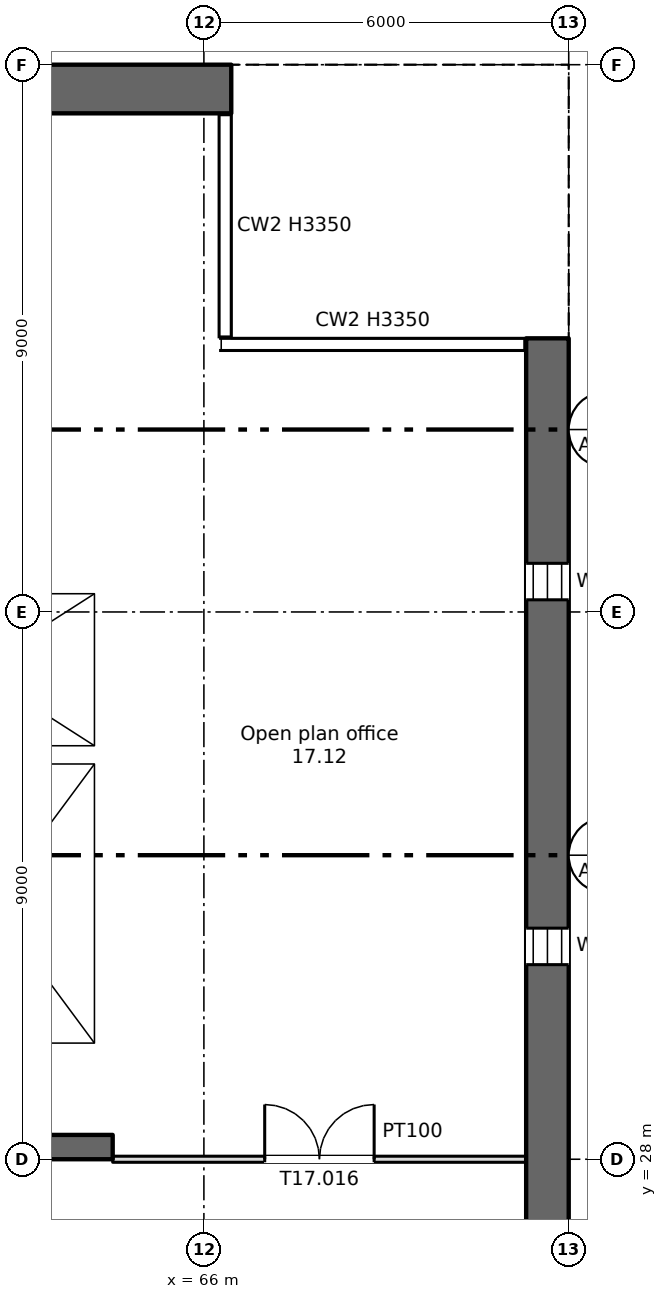
"""IFC4 building model, lengths in metres.
Left out: names, types, materials, properties, quantities, classifications, styles, units other than length and angle.
Written with IfcOpenShell. Run it as: python <this file> out.ifc"""

import sys

from ifc_helpers import new_model, si_unit, direction, frame, frame_2d, origin, place, context, subcontext, project, spatial, rectangle, extrude, element, fill, save


model = new_model("IFC4")
c1 = context("Model", 3, precision=1e-05, world=origin(), true_north=direction((0.0, 1.0)))
c2 = subcontext(c1, "Body", "Model", "MODEL_VIEW")
j1 = project(units=[si_unit("LENGTHUNIT", "METRE"), si_unit("PLANEANGLEUNIT", "RADIAN")], contexts=[c1])
p1 = place(None, origin())
s1 = spatial("IfcSite", under=j1, at=p1, CompositionType="ELEMENT")
p2 = place(p1, origin())
s2 = spatial("IfcBuilding", under=s1, at=p2, CompositionType="ELEMENT")
p3 = place(p2, frame((0.0, 0.0, 106.25)))
s3 = spatial("IfcBuildingStorey", under=s2, at=p3, CompositionType="ELEMENT", Elevation=106.25)
p4 = place(p3, frame((71.65, 6.0, 0.0), z_axis=(0.0, 0.0, 1.0), x_axis=(0.0, 1.0, 0.0)))
e1 = element("IfcWall", 1, at=p4, inside=s3, PredefinedType="SHEAR", context=c2, shape_type="SweptSolid", body=[
    extrude(rectangle(XDim=35.5, YDim=0.7, at=frame_2d((17.75, 0.0))), origin(), (0.0, 0.0, 1.0), 3.35),
])
p5 = place(p4, frame((1.2, 0.0, 0.6)))
e2 = element("IfcOpeningElement", 2, at=p5, cuts=e1, PredefinedType="OPENING", context=c2, shape_type="SweptSolid", body=[
    extrude(rectangle(XDim=0.6, YDim=2.4, at=frame_2d((0.3, 1.2))), frame((0.0, 0.36, 0.0), z_axis=(0.0, -1.0, 0.0), x_axis=(1.0, 0.0, 0.0)), (0.0, 0.0, 1.0), 0.72),
])
p6 = place(p4, frame((7.2, 0.0, 0.6)))
e3 = element("IfcOpeningElement", 3, at=p6, cuts=e1, PredefinedType="OPENING", context=c2, shape_type="SweptSolid", body=[
    extrude(rectangle(XDim=0.6, YDim=2.4, at=frame_2d((0.3, 1.2))), frame((0.0, 0.36, 0.0), z_axis=(0.0, -1.0, 0.0), x_axis=(1.0, 0.0, 0.0)), (0.0, 0.0, 1.0), 0.72),
])
p7 = place(p4, frame((13.2, 0.0, 0.6)))
e4 = element("IfcOpeningElement", 4, at=p7, cuts=e1, PredefinedType="OPENING", context=c2, shape_type="SweptSolid", body=[
    extrude(rectangle(XDim=0.6, YDim=2.4, at=frame_2d((0.3, 1.2))), frame((0.0, 0.36, 0.0), z_axis=(0.0, -1.0, 0.0), x_axis=(1.0, 0.0, 0.0)), (0.0, 0.0, 1.0), 0.72),
])
p8 = place(p4, frame((19.2, 0.0, 0.6)))
e5 = element("IfcOpeningElement", 5, at=p8, cuts=e1, PredefinedType="OPENING", context=c2, shape_type="SweptSolid", body=[
    extrude(rectangle(XDim=0.6, YDim=2.4, at=frame_2d((0.3, 1.2))), frame((0.0, 0.36, 0.0), z_axis=(0.0, -1.0, 0.0), x_axis=(1.0, 0.0, 0.0)), (0.0, 0.0, 1.0), 0.72),
])
p9 = place(p4, frame((25.2, 0.0, 0.6)))
e6 = element("IfcOpeningElement", 6, at=p9, cuts=e1, PredefinedType="OPENING", context=c2, shape_type="SweptSolid", body=[
    extrude(rectangle(XDim=0.6, YDim=2.4, at=frame_2d((0.3, 1.2))), frame((0.0, 0.36, 0.0), z_axis=(0.0, -1.0, 0.0), x_axis=(1.0, 0.0, 0.0)), (0.0, 0.0, 1.0), 0.72),
])
p10 = place(p4, frame((31.2, 0.0, 0.6)))
e7 = element("IfcOpeningElement", 7, at=p10, cuts=e1, PredefinedType="OPENING", context=c2, shape_type="SweptSolid", body=[
    extrude(rectangle(XDim=0.6, YDim=2.4, at=frame_2d((0.3, 1.2))), frame((0.0, 0.36, 0.0), z_axis=(0.0, -1.0, 0.0), x_axis=(1.0, 0.0, 0.0)), (0.0, 0.0, 1.0), 0.72),
])
p11 = place(p3, frame((5.55, 45.6, 0.0), z_axis=(0.0, 0.0, 1.0), x_axis=(1.0, 0.0, 0.0)))
e8 = element("IfcWall", 8, at=p11, inside=s3, PredefinedType="SHEAR", context=c2, shape_type="SweptSolid", body=[
    extrude(rectangle(XDim=60.9, YDim=0.8, at=frame_2d((30.45, 0.0))), origin(), (0.0, 0.0, 1.0), 3.35),
])
p12 = place(p11, frame((1.2, 0.0, 0.6)))
e9 = element("IfcOpeningElement", 9, at=p12, cuts=e8, PredefinedType="OPENING", context=c2, shape_type="SweptSolid", body=[
    extrude(rectangle(XDim=0.6, YDim=2.4, at=frame_2d((0.3, 1.2))), frame((0.0, 0.41, 0.0), z_axis=(0.0, -1.0, 0.0), x_axis=(1.0, 0.0, 0.0)), (0.0, 0.0, 1.0), 0.82),
])
p13 = place(p11, frame((7.2, 0.0, 0.6)))
e10 = element("IfcOpeningElement", 10, at=p13, cuts=e8, PredefinedType="OPENING", context=c2, shape_type="SweptSolid", body=[
    extrude(rectangle(XDim=0.6, YDim=2.4, at=frame_2d((0.3, 1.2))), frame((0.0, 0.41, 0.0), z_axis=(0.0, -1.0, 0.0), x_axis=(1.0, 0.0, 0.0)), (0.0, 0.0, 1.0), 0.82),
])
p14 = place(p3, frame((6.7, 28.2, 0.0), z_axis=(0.0, 0.0, 1.0), x_axis=(1.0, 0.0, 0.0)))
e11 = element("IfcWall", 11, at=p14, inside=s3, PredefinedType="SHEAR", context=c2, shape_type="SweptSolid", body=[
    extrude(rectangle(XDim=57.8, YDim=0.4, at=frame_2d((28.9, 0.0))), origin(), (0.0, 0.0, 1.0), 3.35),
])
p15 = place(p14, frame((13.85, 0.0, 0.0)))
e12 = element("IfcOpeningElement", 12, at=p15, cuts=e11, PredefinedType="OPENING", context=c2, shape_type="SweptSolid", body=[
    extrude(rectangle(XDim=0.9, YDim=2.1, at=frame_2d((0.45, 1.05))), frame((0.0, 0.21, 0.0), z_axis=(0.0, -1.0, 0.0), x_axis=(1.0, 0.0, 0.0)), (0.0, 0.0, 1.0), 0.42),
])
p16 = place(p14, frame((48.562, 0.0, 0.0)))
e13 = element("IfcOpeningElement", 13, at=p16, cuts=e11, PredefinedType="OPENING", context=c2, shape_type="SweptSolid", body=[
    extrude(rectangle(XDim=0.9, YDim=2.1, at=frame_2d((0.45, 1.05))), frame((0.0, 0.21, 0.0), z_axis=(0.0, -1.0, 0.0), x_axis=(1.0, 0.0, 0.0)), (0.0, 0.0, 1.0), 0.42),
])
p17 = place(p14, frame((51.137, 0.0, 0.0)))
e14 = element("IfcOpeningElement", 14, at=p17, cuts=e11, PredefinedType="OPENING", context=c2, shape_type="SweptSolid", body=[
    extrude(rectangle(XDim=0.9, YDim=2.1, at=frame_2d((0.45, 1.05))), frame((0.0, 0.21, 0.0), z_axis=(0.0, -1.0, 0.0), x_axis=(1.0, 0.0, 0.0)), (0.0, 0.0, 1.0), 0.42),
])
p18 = place(p14, frame((1.35, 0.0, 0.0)))
e15 = element("IfcOpeningElement", 15, at=p18, cuts=e11, PredefinedType="OPENING", context=c2, shape_type="SweptSolid", body=[
    extrude(rectangle(XDim=0.9, YDim=2.1, at=frame_2d((0.45, 1.05))), frame((0.0, 0.21, 0.0), z_axis=(0.0, -1.0, 0.0), x_axis=(1.0, 0.0, 0.0)), (0.0, 0.0, 1.0), 0.42),
])
p19 = place(p14, frame((4.7, 0.0, 0.0)))
e16 = element("IfcOpeningElement", 16, at=p19, cuts=e11, PredefinedType="OPENING", context=c2, shape_type="SweptSolid", body=[
    extrude(rectangle(XDim=1.2, YDim=2.1, at=frame_2d((0.6, 1.05))), frame((0.0, 0.21, 0.0), z_axis=(0.0, -1.0, 0.0), x_axis=(1.0, 0.0, 0.0)), (0.0, 0.0, 1.0), 0.42),
])
p20 = place(p14, frame((31.7, 0.0, 0.0)))
e17 = element("IfcOpeningElement", 17, at=p20, cuts=e11, PredefinedType="OPENING", context=c2, shape_type="SweptSolid", body=[
    extrude(rectangle(XDim=1.2, YDim=2.1, at=frame_2d((0.6, 1.05))), frame((0.0, 0.21, 0.0), z_axis=(0.0, -1.0, 0.0), x_axis=(1.0, 0.0, 0.0)), (0.0, 0.0, 1.0), 0.42),
])
p21 = place(p14, frame((55.2, 0.0, 0.0)))
e18 = element("IfcOpeningElement", 18, at=p21, cuts=e11, PredefinedType="OPENING", context=c2, shape_type="SweptSolid", body=[
    extrude(rectangle(XDim=1.2, YDim=2.1, at=frame_2d((0.6, 1.05))), frame((0.0, 0.21, 0.0), z_axis=(0.0, -1.0, 0.0), x_axis=(1.0, 0.0, 0.0)), (0.0, 0.0, 1.0), 0.42),
])
p22 = place(p14, frame((21.7, 0.0, 0.0)))
e19 = element("IfcOpeningElement", 19, at=p22, cuts=e11, PredefinedType="OPENING", context=c2, shape_type="SweptSolid", body=[
    extrude(rectangle(XDim=1.2, YDim=2.1, at=frame_2d((0.6, 1.05))), frame((0.0, 0.21, 0.0), z_axis=(0.0, -1.0, 0.0), x_axis=(1.0, 0.0, 0.0)), (0.0, 0.0, 1.0), 0.42),
])
p23 = place(p14, frame((41.7, 0.0, 0.0)))
e20 = element("IfcOpeningElement", 20, at=p23, cuts=e11, PredefinedType="OPENING", context=c2, shape_type="SweptSolid", body=[
    extrude(rectangle(XDim=1.2, YDim=2.1, at=frame_2d((0.6, 1.05))), frame((0.0, 0.21, 0.0), z_axis=(0.0, -1.0, 0.0), x_axis=(1.0, 0.0, 0.0)), (0.0, 0.0, 1.0), 0.42),
])
p24 = place(p14, frame((24.85, 0.0, 0.0)))
e21 = element("IfcOpeningElement", 21, at=p24, cuts=e11, PredefinedType="OPENING", context=c2, shape_type="SweptSolid", body=[
    extrude(rectangle(XDim=2.4, YDim=2.1, at=frame_2d((1.2, 1.05))), frame((0.0, 0.21, 0.0), z_axis=(0.0, -1.0, 0.0), x_axis=(1.0, 0.0, 0.0)), (0.0, 0.0, 1.0), 0.42),
])
p25 = place(p14, frame((37.35, 0.0, 0.0)))
e22 = element("IfcOpeningElement", 22, at=p25, cuts=e11, PredefinedType="OPENING", context=c2, shape_type="SweptSolid", body=[
    extrude(rectangle(XDim=2.4, YDim=2.1, at=frame_2d((1.2, 1.05))), frame((0.0, 0.21, 0.0), z_axis=(0.0, -1.0, 0.0), x_axis=(1.0, 0.0, 0.0)), (0.0, 0.0, 1.0), 0.42),
])
p26 = place(p14, frame((7.95, 0.0, 0.0)))
e23 = element("IfcOpeningElement", 23, at=p26, cuts=e11, PredefinedType="OPENING", context=c2, shape_type="SweptSolid", body=[
    extrude(rectangle(XDim=2.4, YDim=2.1, at=frame_2d((1.2, 1.05))), frame((0.0, 0.21, 0.0), z_axis=(0.0, -1.0, 0.0), x_axis=(1.0, 0.0, 0.0)), (0.0, 0.0, 1.0), 0.42),
])
p27 = place(p14, frame((28.85, 0.0, 0.0)))
e24 = element("IfcOpeningElement", 24, at=p27, cuts=e11, PredefinedType="OPENING", context=c2, shape_type="SweptSolid", body=[
    extrude(rectangle(XDim=0.9, YDim=2.1, at=frame_2d((0.45, 1.05))), frame((0.0, 0.21, 0.0), z_axis=(0.0, -1.0, 0.0), x_axis=(1.0, 0.0, 0.0)), (0.0, 0.0, 1.0), 0.42),
])
p28 = place(p14, frame((34.85, 0.0, 0.0)))
e25 = element("IfcOpeningElement", 25, at=p28, cuts=e11, PredefinedType="OPENING", context=c2, shape_type="SweptSolid", body=[
    extrude(rectangle(XDim=0.9, YDim=2.1, at=frame_2d((0.45, 1.05))), frame((0.0, 0.21, 0.0), z_axis=(0.0, -1.0, 0.0), x_axis=(1.0, 0.0, 0.0)), (0.0, 0.0, 1.0), 0.42),
])
p29 = place(p3, frame((64.35, 34.8, 0.0), z_axis=(0.0, 0.0, 1.0), x_axis=(0.0, 1.0, 0.0)))
e26 = element("IfcWall", 26, at=p29, inside=s3, PredefinedType="SHEAR", context=c2, shape_type="SweptSolid", body=[
    extrude(rectangle(XDim=10.4, YDim=0.3, at=frame_2d((5.2, 0.0))), origin(), (0.0, 0.0, 1.0), 3.35),
])
p30 = place(p3, frame((64.35, 28.4, 0.0), z_axis=(0.0, 0.0, 1.0), x_axis=(0.0, 1.0, 0.0)))
e27 = element("IfcWall", 27, at=p30, inside=s3, PredefinedType="SHEAR", context=c2, shape_type="SweptSolid", body=[
    extrude(rectangle(XDim=6.1, YDim=0.3, at=frame_2d((3.05, 0.0))), origin(), (0.0, 0.0, 1.0), 3.35),
])
p31 = place(p3, frame((60.3, 34.65, 0.0), z_axis=(0.0, 0.0, 1.0), x_axis=(1.0, 0.0, 0.0)))
e28 = element("IfcWall", 28, at=p31, inside=s3, PredefinedType="SHEAR", context=c2, shape_type="SweptSolid", body=[
    extrude(rectangle(XDim=4.2, YDim=0.3, at=frame_2d((2.1, 0.0))), origin(), (0.0, 0.0, 1.0), 3.35),
])
p32 = place(p3, frame((60.3, 37.45, 0.0), z_axis=(0.0, 0.0, 1.0), x_axis=(1.0, 0.0, 0.0)))
e29 = element("IfcWall", 29, at=p32, inside=s3, PredefinedType="SHEAR", context=c2, shape_type="SweptSolid", body=[
    extrude(rectangle(XDim=3.9, YDim=0.3, at=frame_2d((1.95, 0.0))), origin(), (0.0, 0.0, 1.0), 3.35),
])
p33 = place(p32, frame((1.4, 0.0, 0.0)))
e30 = element("IfcOpeningElement", 30, at=p33, cuts=e29, PredefinedType="OPENING", context=c2, shape_type="SweptSolid", body=[
    extrude(rectangle(XDim=1.1, YDim=2.1, at=frame_2d((0.55, 1.05))), frame((0.0, 0.16, 0.0), z_axis=(0.0, -1.0, 0.0), x_axis=(1.0, 0.0, 0.0)), (0.0, 0.0, 1.0), 0.32),
])
p34 = place(p3, frame((64.5, 28.0, 0.0), z_axis=(0.0, 0.0, 1.0), x_axis=(1.0, 0.0, 0.0)))
e31 = element("IfcWall", 31, at=p34, inside=s3, PredefinedType="PARTITIONING", context=c2, shape_type="SweptSolid", body=[
    extrude(rectangle(XDim=6.8, YDim=0.1, at=frame_2d((3.4, 0.0))), origin(), (0.0, 0.0, 1.0), 3.35),
])
p35 = place(p34, frame((2.5, 0.0, 0.0)))
e32 = element("IfcOpeningElement", 32, at=p35, cuts=e31, PredefinedType="OPENING", context=c2, shape_type="SweptSolid", body=[
    extrude(rectangle(XDim=1.8, YDim=2.1, at=frame_2d((0.9, 1.05))), frame((0.0, 0.06, 0.0), z_axis=(0.0, -1.0, 0.0), x_axis=(1.0, 0.0, 0.0)), (0.0, 0.0, 1.0), 0.12),
])
p36 = place(p9, origin())
e33 = element("IfcWindow", 33, at=p36, inside=s3, PartitioningType="SINGLE_PANEL", PredefinedType="WINDOW", context=c2, shape_type="SweptSolid", body=[
    extrude(rectangle(XDim=0.6, YDim=2.4, at=frame_2d((0.3, 1.2))), frame((0.0, 0.03, 0.0), z_axis=(0.0, -1.0, 0.0), x_axis=(1.0, 0.0, 0.0)), (0.0, 0.0, 1.0), 0.06),
])
fill(e6, e33)
p37 = place(p10, origin())
e34 = element("IfcWindow", 34, at=p37, inside=s3, PartitioningType="SINGLE_PANEL", PredefinedType="WINDOW", context=c2, shape_type="SweptSolid", body=[
    extrude(rectangle(XDim=0.6, YDim=2.4, at=frame_2d((0.3, 1.2))), frame((0.0, 0.03, 0.0), z_axis=(0.0, -1.0, 0.0), x_axis=(1.0, 0.0, 0.0)), (0.0, 0.0, 1.0), 0.06),
])
fill(e7, e34)
p38 = place(p35, origin())
e35 = element("IfcDoor", 35, at=p38, inside=s3, OperationType="DOUBLE_DOOR_SINGLE_SWING", PredefinedType="DOOR", context=c2, shape_type="SweptSolid", body=[
    extrude(rectangle(XDim=1.8, YDim=2.1, at=frame_2d((0.9, 1.05))), frame((0.0, 0.025, 0.0), z_axis=(0.0, -1.0, 0.0), x_axis=(1.0, 0.0, 0.0)), (0.0, 0.0, 1.0), 0.05),
])
fill(e32, e35)
save(model, sys.argv[1])
